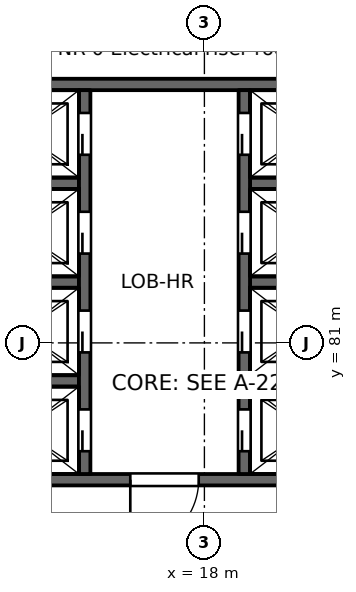
"""IFC4 building model, lengths in metres.
Left out: names, types, materials, properties, quantities, classifications, styles, units other than length and angle.
Written with IfcOpenShell. Run it as: python <this file> out.ifc"""

import sys

from ifc_helpers import new_model, si_unit, direction, frame, frame_2d, origin, place, context, subcontext, project, spatial, rectangle, extrude, element, fill, save


model = new_model("IFC4")
c1 = context("Model", 3, precision=1e-05, world=origin(), true_north=direction((0.0, 1.0)))
c2 = subcontext(c1, "Body", "Model", "MODEL_VIEW")
j1 = project(units=[si_unit("LENGTHUNIT", "METRE"), si_unit("PLANEANGLEUNIT", "RADIAN")], contexts=[c1])
p1 = place(None, origin())
s1 = spatial("IfcSite", under=j1, at=p1, CompositionType="ELEMENT")
p2 = place(p1, origin())
s2 = spatial("IfcBuilding", under=s1, at=p2, CompositionType="ELEMENT")
p3 = place(p2, frame((0.0, 0.0, 299.3)))
s3 = spatial("IfcBuildingStorey", under=s2, at=p3, CompositionType="ELEMENT", Elevation=299.3)
p4 = place(p3, frame((0.9, 77.4, -0.4), z_axis=(0.0, 0.0, 1.0), x_axis=(1.0, 0.0, 0.0)))
e1 = element("IfcWall", 1, at=p4, inside=s3, PredefinedType="SOLIDWALL", context=c2, shape_type="SweptSolid", body=[
    extrude(rectangle(XDim=21.45, YDim=0.3, at=frame_2d((10.725, 0.0))), origin(), (0.0, 0.0, 1.0), 3.65),
])
p5 = place(p4, frame((15.15, 0.0, 0.4)))
e2 = element("IfcOpeningElement", 2, at=p5, cuts=e1, PredefinedType="OPENING", context=c2, shape_type="SweptSolid", body=[
    extrude(rectangle(XDim=1.8, YDim=2.1, at=frame_2d((0.9, 1.05))), frame((0.0, 0.15, 0.0), z_axis=(0.0, -1.0, 0.0), x_axis=(1.0, 0.0, 0.0)), (0.0, 0.0, 1.0), 0.3),
])
p6 = place(p4, frame((2.35, 0.0, 0.4)))
e3 = element("IfcOpeningElement", 3, at=p6, cuts=e1, PredefinedType="OPENING", context=c2, shape_type="SweptSolid", body=[
    extrude(rectangle(XDim=1.0, YDim=2.1, at=frame_2d((0.5, 1.05))), frame((0.0, 0.15, 0.0), z_axis=(0.0, -1.0, 0.0), x_axis=(1.0, 0.0, 0.0)), (0.0, 0.0, 1.0), 0.3),
])
p7 = place(p4, frame((7.75, 0.0, 0.4)))
e4 = element("IfcOpeningElement", 4, at=p7, cuts=e1, PredefinedType="OPENING", context=c2, shape_type="SweptSolid", body=[
    extrude(rectangle(XDim=1.0, YDim=2.1, at=frame_2d((0.5, 1.05))), frame((0.0, 0.15, 0.0), z_axis=(0.0, -1.0, 0.0), x_axis=(1.0, 0.0, 0.0)), (0.0, 0.0, 1.0), 0.3),
])
for number, where, z_axis, x_axis in (
    (5, (11.7, 80.0, -0.4), (0.0, 0.0, 1.0), (1.0, 0.0, 0.0)),
    (6, (19.2, 80.0, -0.4), (0.0, 0.0, 1.0), (1.0, 0.0, 0.0)),
    (7, (11.7, 82.6, -0.4), (0.0, 0.0, 1.0), (1.0, 0.0, 0.0)),
    (8, (19.2, 82.6, -0.4), (0.0, 0.0, 1.0), (1.0, 0.0, 0.0)),
    (9, (11.7, 85.2, -0.4), (0.0, 0.0, 1.0), (1.0, 0.0, 0.0)),
    (10, (19.2, 85.2, -0.4), (0.0, 0.0, 1.0), (1.0, 0.0, 0.0)),
):
    element("IfcWall", number, at=place(p3, frame(where, z_axis=z_axis, x_axis=x_axis)), inside=s3, PredefinedType="SOLIDWALL", context=c2, shape_type="SweptSolid", body=[
        extrude(rectangle(XDim=3.0, YDim=0.3, at=frame_2d((1.5, 0.0))), origin(), (0.0, 0.0, 1.0), 3.65),
    ])
p8 = place(p3, frame((11.4, 87.8, -0.4), z_axis=(0.0, 0.0, 1.0), x_axis=(1.0, 0.0, 0.0)))
e11 = element("IfcWall", 11, at=p8, inside=s3, PredefinedType="SOLIDWALL", context=c2, shape_type="SweptSolid", body=[
    extrude(rectangle(XDim=11.1, YDim=0.3, at=frame_2d((5.55, 0.0))), origin(), (0.0, 0.0, 1.0), 3.65),
])
p9 = place(p3, frame((14.85, 77.55, -0.4), z_axis=(0.0, 0.0, 1.0), x_axis=(0.0, 1.0, 0.0)))
e12 = element("IfcWall", 12, at=p9, inside=s3, PredefinedType="SOLIDWALL", context=c2, shape_type="SweptSolid", body=[
    extrude(rectangle(XDim=10.1, YDim=0.3, at=frame_2d((5.05, 0.0))), origin(), (0.0, 0.0, 1.0), 3.65),
])
p10 = place(p9, frame((0.6, 0.0, 0.4)))
e13 = element("IfcOpeningElement", 13, at=p10, cuts=e12, PredefinedType="OPENING", context=c2, shape_type="SweptSolid", body=[
    extrude(rectangle(XDim=1.1, YDim=2.1, at=frame_2d((0.55, 1.05))), frame((0.0, 0.15, 0.0), z_axis=(0.0, -1.0, 0.0), x_axis=(1.0, 0.0, 0.0)), (0.0, 0.0, 1.0), 0.3),
])
p11 = place(p9, frame((3.2, 0.0, 0.4)))
e14 = element("IfcOpeningElement", 14, at=p11, cuts=e12, PredefinedType="OPENING", context=c2, shape_type="SweptSolid", body=[
    extrude(rectangle(XDim=1.1, YDim=2.1, at=frame_2d((0.55, 1.05))), frame((0.0, 0.15, 0.0), z_axis=(0.0, -1.0, 0.0), x_axis=(1.0, 0.0, 0.0)), (0.0, 0.0, 1.0), 0.3),
])
p12 = place(p9, frame((5.8, 0.0, 0.4)))
e15 = element("IfcOpeningElement", 15, at=p12, cuts=e12, PredefinedType="OPENING", context=c2, shape_type="SweptSolid", body=[
    extrude(rectangle(XDim=1.1, YDim=2.1, at=frame_2d((0.55, 1.05))), frame((0.0, 0.15, 0.0), z_axis=(0.0, -1.0, 0.0), x_axis=(1.0, 0.0, 0.0)), (0.0, 0.0, 1.0), 0.3),
])
p13 = place(p9, frame((8.4, 0.0, 0.4)))
e16 = element("IfcOpeningElement", 16, at=p13, cuts=e12, PredefinedType="OPENING", context=c2, shape_type="SweptSolid", body=[
    extrude(rectangle(XDim=1.1, YDim=2.1, at=frame_2d((0.55, 1.05))), frame((0.0, 0.15, 0.0), z_axis=(0.0, -1.0, 0.0), x_axis=(1.0, 0.0, 0.0)), (0.0, 0.0, 1.0), 0.3),
])
p14 = place(p3, frame((19.05, 77.55, -0.4), z_axis=(0.0, 0.0, 1.0), x_axis=(0.0, 1.0, 0.0)))
e17 = element("IfcWall", 17, at=p14, inside=s3, PredefinedType="SOLIDWALL", context=c2, shape_type="SweptSolid", body=[
    extrude(rectangle(XDim=10.1, YDim=0.3, at=frame_2d((5.05, 0.0))), origin(), (0.0, 0.0, 1.0), 3.65),
])
p15 = place(p14, frame((0.6, 0.0, 0.4)))
e18 = element("IfcOpeningElement", 18, at=p15, cuts=e17, PredefinedType="OPENING", context=c2, shape_type="SweptSolid", body=[
    extrude(rectangle(XDim=1.1, YDim=2.1, at=frame_2d((0.55, 1.05))), frame((0.0, 0.15, 0.0), z_axis=(0.0, -1.0, 0.0), x_axis=(1.0, 0.0, 0.0)), (0.0, 0.0, 1.0), 0.3),
])
p16 = place(p14, frame((3.2, 0.0, 0.4)))
e19 = element("IfcOpeningElement", 19, at=p16, cuts=e17, PredefinedType="OPENING", context=c2, shape_type="SweptSolid", body=[
    extrude(rectangle(XDim=1.1, YDim=2.1, at=frame_2d((0.55, 1.05))), frame((0.0, 0.15, 0.0), z_axis=(0.0, -1.0, 0.0), x_axis=(1.0, 0.0, 0.0)), (0.0, 0.0, 1.0), 0.3),
])
p17 = place(p14, frame((5.8, 0.0, 0.4)))
e20 = element("IfcOpeningElement", 20, at=p17, cuts=e17, PredefinedType="OPENING", context=c2, shape_type="SweptSolid", body=[
    extrude(rectangle(XDim=1.1, YDim=2.1, at=frame_2d((0.55, 1.05))), frame((0.0, 0.15, 0.0), z_axis=(0.0, -1.0, 0.0), x_axis=(1.0, 0.0, 0.0)), (0.0, 0.0, 1.0), 0.3),
])
p18 = place(p14, frame((8.4, 0.0, 0.4)))
e21 = element("IfcOpeningElement", 21, at=p18, cuts=e17, PredefinedType="OPENING", context=c2, shape_type="SweptSolid", body=[
    extrude(rectangle(XDim=1.1, YDim=2.1, at=frame_2d((0.55, 1.05))), frame((0.0, 0.15, 0.0), z_axis=(0.0, -1.0, 0.0), x_axis=(1.0, 0.0, 0.0)), (0.0, 0.0, 1.0), 0.3),
])
p19 = place(p10, origin())
e22 = element("IfcDoor", 22, at=p19, inside=s3, OperationType="SLIDING_TO_RIGHT", PredefinedType="DOOR", context=c2, shape_type="SweptSolid", body=[
    extrude(rectangle(XDim=1.1, YDim=2.1, at=frame_2d((0.55, 1.05))), frame((0.0, 0.025, 0.0), z_axis=(0.0, -1.0, 0.0), x_axis=(1.0, 0.0, 0.0)), (0.0, 0.0, 1.0), 0.05),
])
fill(e13, e22)
p20 = place(p11, origin())
e23 = element("IfcDoor", 23, at=p20, inside=s3, OperationType="SLIDING_TO_LEFT", PredefinedType="DOOR", context=c2, shape_type="SweptSolid", body=[
    extrude(rectangle(XDim=1.1, YDim=2.1, at=frame_2d((0.55, 1.05))), frame((0.0, 0.025, 0.0), z_axis=(0.0, -1.0, 0.0), x_axis=(1.0, 0.0, 0.0)), (0.0, 0.0, 1.0), 0.05),
])
fill(e14, e23)
p21 = place(p12, origin())
e24 = element("IfcDoor", 24, at=p21, inside=s3, OperationType="SLIDING_TO_RIGHT", PredefinedType="DOOR", context=c2, shape_type="SweptSolid", body=[
    extrude(rectangle(XDim=1.1, YDim=2.1, at=frame_2d((0.55, 1.05))), frame((0.0, 0.025, 0.0), z_axis=(0.0, -1.0, 0.0), x_axis=(1.0, 0.0, 0.0)), (0.0, 0.0, 1.0), 0.05),
])
fill(e15, e24)
p22 = place(p13, origin())
e25 = element("IfcDoor", 25, at=p22, inside=s3, OperationType="SLIDING_TO_LEFT", PredefinedType="DOOR", context=c2, shape_type="SweptSolid", body=[
    extrude(rectangle(XDim=1.1, YDim=2.1, at=frame_2d((0.55, 1.05))), frame((0.0, 0.025, 0.0), z_axis=(0.0, -1.0, 0.0), x_axis=(1.0, 0.0, 0.0)), (0.0, 0.0, 1.0), 0.05),
])
fill(e16, e25)
p23 = place(p15, origin())
e26 = element("IfcDoor", 26, at=p23, inside=s3, OperationType="SLIDING_TO_RIGHT", PredefinedType="DOOR", context=c2, shape_type="SweptSolid", body=[
    extrude(rectangle(XDim=1.1, YDim=2.1, at=frame_2d((0.55, 1.05))), frame((0.0, 0.025, 0.0), z_axis=(0.0, -1.0, 0.0), x_axis=(1.0, 0.0, 0.0)), (0.0, 0.0, 1.0), 0.05),
])
fill(e18, e26)
p24 = place(p16, origin())
e27 = element("IfcDoor", 27, at=p24, inside=s3, OperationType="SLIDING_TO_LEFT", PredefinedType="DOOR", context=c2, shape_type="SweptSolid", body=[
    extrude(rectangle(XDim=1.1, YDim=2.1, at=frame_2d((0.55, 1.05))), frame((0.0, 0.025, 0.0), z_axis=(0.0, -1.0, 0.0), x_axis=(1.0, 0.0, 0.0)), (0.0, 0.0, 1.0), 0.05),
])
fill(e19, e27)
p25 = place(p17, origin())
e28 = element("IfcDoor", 28, at=p25, inside=s3, OperationType="SLIDING_TO_RIGHT", PredefinedType="DOOR", context=c2, shape_type="SweptSolid", body=[
    extrude(rectangle(XDim=1.1, YDim=2.1, at=frame_2d((0.55, 1.05))), frame((0.0, 0.025, 0.0), z_axis=(0.0, -1.0, 0.0), x_axis=(1.0, 0.0, 0.0)), (0.0, 0.0, 1.0), 0.05),
])
fill(e20, e28)
p26 = place(p18, origin())
e29 = element("IfcDoor", 29, at=p26, inside=s3, OperationType="SLIDING_TO_LEFT", PredefinedType="DOOR", context=c2, shape_type="SweptSolid", body=[
    extrude(rectangle(XDim=1.1, YDim=2.1, at=frame_2d((0.55, 1.05))), frame((0.0, 0.025, 0.0), z_axis=(0.0, -1.0, 0.0), x_axis=(1.0, 0.0, 0.0)), (0.0, 0.0, 1.0), 0.05),
])
fill(e21, e29)
p27 = place(p5, frame((1.8, 0.0, 0.0), z_axis=(0.0, 0.0, 1.0), x_axis=(-1.0, 0.0, 0.0)))
e30 = element("IfcDoor", 30, at=p27, inside=s3, OperationType="SINGLE_SWING_RIGHT", PredefinedType="DOOR", context=c2, shape_type="SweptSolid", body=[
    extrude(rectangle(XDim=1.8, YDim=2.1, at=frame_2d((0.9, 1.05))), frame((0.0, 0.025, 0.0), z_axis=(0.0, -1.0, 0.0), x_axis=(1.0, 0.0, 0.0)), (0.0, 0.0, 1.0), 0.05),
])
fill(e2, e30)
save(model, sys.argv[1])
